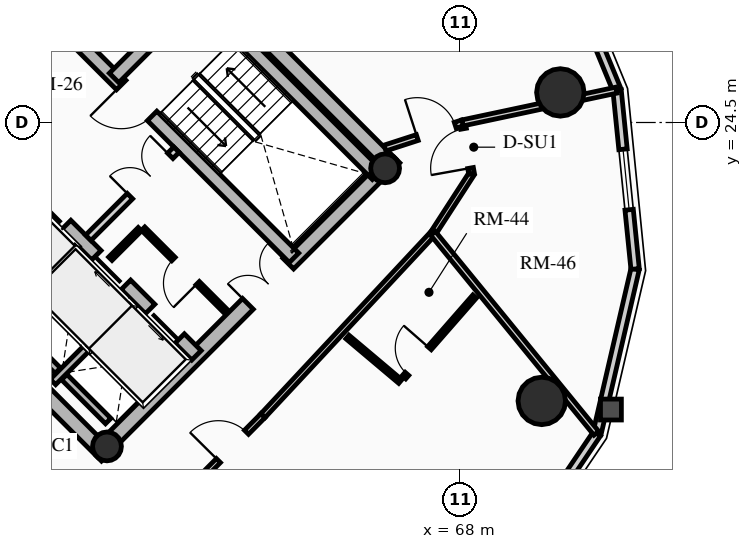
"""IFC4 building model, lengths in metres.
Left out: names, types, materials, properties, quantities, classifications, styles, units other than length and angle.
Written with IfcOpenShell. Run it as: python <this file> out.ifc"""

import sys

from ifc_helpers import new_model, si_unit, direction, frame, frame_2d, origin, origin_2d, place, context, subcontext, project, spatial, rectangle, circle, hollow_circle, extrude, source, transform, mapped, element, fill, save


model = new_model("IFC4")
c1 = context("Model", 3, precision=1e-05, world=origin(), true_north=direction((0.0, 1.0)))
c2 = subcontext(c1, "Body", "Model", "MODEL_VIEW")
j1 = project(units=[si_unit("LENGTHUNIT", "METRE"), si_unit("PLANEANGLEUNIT", "RADIAN")], contexts=[c1])
p1 = place(None, origin())
s1 = spatial("IfcSite", under=j1, at=p1, CompositionType="ELEMENT")
p2 = place(p1, origin())
s2 = spatial("IfcBuilding", under=s1, at=p2, CompositionType="ELEMENT")
p3 = place(p2, frame((0.0, 0.0, 183.61)))
s3 = spatial("IfcBuildingStorey", under=s2, at=p3, CompositionType="ELEMENT", Elevation=183.61)
for number, where, z_axis, x_axis in (
    (1, (58.702, 15.732, 0.0), (0.0, 0.0, 1.0), (-0.707, 0.707, 0.0)),
    (2, (66.268, 23.298, 0.0), (0.0, 0.0, 1.0), (-0.707, 0.707, 0.0)),
):
    element("IfcWall", number, at=place(p3, frame(where, z_axis=z_axis, x_axis=x_axis)), inside=s3, PredefinedType="SHEAR", context=c2, shape_type="SweptSolid", body=[
        extrude(rectangle(XDim=14.1, YDim=0.4, at=frame_2d((7.05, 0.0))), origin(), (0.0, 0.0, 1.0), 2.91),
    ])
p4 = place(p3, frame((58.561, 15.873, 0.0), z_axis=(0.0, 0.0, 1.0), x_axis=(0.707106781187, 0.707106781187, 0.0)))
e3 = element("IfcWall", 3, at=p4, inside=s3, PredefinedType="SHEAR", context=c2, shape_type="SweptSolid", body=[
    extrude(rectangle(XDim=10.7, YDim=0.4, at=frame_2d((5.35, 0.0))), origin(), (0.0, 0.0, 1.0), 2.91),
])
m1 = source(origin(), c2, "Body", "SweptSolid", [
    extrude(rectangle(XDim=1.5, YDim=2.02, at=frame_2d((0.75, 1.01))), frame((0.0, 0.21, 0.0), z_axis=(0.0, -1.0, 0.0), x_axis=(1.0, 0.0, 0.0)), (0.0, 0.0, 1.0), 0.42),
])
p5 = place(p4, frame((5.45, 0.0, 0.0)))
e4 = element("IfcOpeningElement", 4, at=p5, cuts=e3, PredefinedType="OPENING", context=c2, shape_type="MappedRepresentation", body=[
    mapped(m1, transform((0.0, 0.0, 0.0), x_axis=(1.0, 0.0, 0.0), y_axis=(0.0, 1.0, 0.0), z_axis=(0.0, 0.0, 1.0), scale=1.0)),
])
p6 = place(p3, frame((61.06, 18.373, 0.0), z_axis=(0.0, 0.0, 1.0), x_axis=(-0.707106781187, 0.707106781187, 0.0)))
e5 = element("IfcWall", 5, at=p6, inside=s3, PredefinedType="SHEAR", context=c2, shape_type="SweptSolid", body=[
    extrude(rectangle(XDim=13.7, YDim=0.35, at=frame_2d((6.85, 0.0))), origin(), (0.0, 0.0, 1.0), 2.91),
])
m2 = source(origin(), c2, "Body", "SweptSolid", [
    extrude(rectangle(XDim=1.1, YDim=2.015, at=frame_2d((0.55, 1.007))), frame((0.0, 0.185, 0.0), z_axis=(0.0, -1.0, 0.0), x_axis=(1.0, 0.0, 0.0)), (0.0, 0.0, 1.0), 0.37),
])
p7 = place(p6, frame((4.85, 0.0, 0.0)))
e6 = element("IfcOpeningElement", 6, at=p7, cuts=e5, PredefinedType="OPENING", context=c2, shape_type="MappedRepresentation", body=[
    mapped(m2, transform((0.0, 0.0, 0.0), x_axis=(1.0, 0.0, 0.0), y_axis=(0.0, 1.0, 0.0), z_axis=(0.0, 0.0, 1.0), scale=1.0)),
])
p8 = place(p6, frame((0.625, 0.0, 0.0)))
e7 = element("IfcOpeningElement", 7, at=p8, cuts=e5, PredefinedType="OPENING", context=c2, shape_type="MappedRepresentation", body=[
    mapped(m2, transform((0.0, 0.0, 0.0), x_axis=(1.0, 0.0, 0.0), y_axis=(0.0, 1.0, 0.0), z_axis=(0.0, 0.0, 1.0), scale=1.0)),
])
p9 = place(p6, frame((2.625, 0.0, 0.0)))
e8 = element("IfcOpeningElement", 8, at=p9, cuts=e5, PredefinedType="OPENING", context=c2, shape_type="MappedRepresentation", body=[
    mapped(m2, transform((0.0, 0.0, 0.0), x_axis=(1.0, 0.0, 0.0), y_axis=(0.0, 1.0, 0.0), z_axis=(0.0, 0.0, 1.0), scale=1.0)),
])
m3 = source(origin(), c2, "Body", "SweptSolid", [
    extrude(rectangle(XDim=1.15, YDim=2.02, at=frame_2d((0.575, 1.01))), frame((0.0, 0.185, 0.0), z_axis=(0.0, -1.0, 0.0), x_axis=(1.0, 0.0, 0.0)), (0.0, 0.0, 1.0), 0.37),
])
p10 = place(p6, frame((7.27, 0.0, 0.0)))
e9 = element("IfcOpeningElement", 9, at=p10, cuts=e5, PredefinedType="OPENING", context=c2, shape_type="MappedRepresentation", body=[
    mapped(m3, transform((0.0, 0.0, 0.0), x_axis=(1.0, 0.0, 0.0), y_axis=(0.0, 1.0, 0.0), z_axis=(0.0, 0.0, 1.0), scale=1.0)),
])
p11 = place(p3, frame((63.627, 20.94, 0.0), z_axis=(0.0, 0.0, 1.0), x_axis=(-0.707119496762, 0.707094065383, 0.0)))
e10 = element("IfcWall", 10, at=p11, inside=s3, PredefinedType="SHEAR", context=c2, shape_type="SweptSolid", body=[
    extrude(rectangle(XDim=9.6, YDim=0.35, at=frame_2d((4.8, 0.0))), origin(), (0.0, 0.0, 1.0), 2.91),
])
p12 = place(p11, frame((5.28, 0.0, 0.0)))
e11 = element("IfcOpeningElement", 11, at=p12, cuts=e10, PredefinedType="OPENING", context=c2, shape_type="MappedRepresentation", body=[
    mapped(m3, transform((0.0, 0.0, 0.0), x_axis=(1.0, 0.0, 0.0), y_axis=(0.0, 1.0, 0.0), z_axis=(0.0, 0.0, 1.0), scale=1.0)),
])
p13 = place(p3, frame((65.812, 23.125, 0.0), z_axis=(0.0, 0.0, 1.0), x_axis=(-0.707106781187, 0.707106781187, 0.0)))
e12 = element("IfcWall", 12, at=p13, inside=s3, PredefinedType="SHEAR", context=c2, shape_type="SweptSolid", body=[
    extrude(rectangle(XDim=6.695, YDim=0.35, at=frame_2d((3.348, 0.0))), origin(), (0.0, 0.0, 1.0), 2.91),
])
p14 = place(p3, frame((58.893, 25.674, 0.0), z_axis=(0.0, 0.0, 1.0), x_axis=(0.707106781187, 0.707106781187, 0.0)))
e13 = element("IfcWall", 13, at=p14, inside=s3, PredefinedType="SHEAR", context=c2, shape_type="SweptSolid", body=[
    extrude(rectangle(XDim=3.285, YDim=0.35, at=frame_2d((1.643, 0.0))), origin(), (0.0, 0.0, 1.0), 2.91),
])
for number, where, z_axis, x_axis in (
    (14, (58.706, 15.976, 0.0), (0.0, 0.0, 1.0), (0.707, 0.707, 0.0)),
    (15, (66.024, 23.294, 0.0), (0.0, 0.0, 1.0), (0.707, 0.707, 0.0)),
):
    element("IfcColumn", number, at=place(p3, frame(where, z_axis=z_axis, x_axis=x_axis)), inside=s3, PredefinedType="COLUMN", context=c2, shape_type="SweptSolid", body=[
        extrude(hollow_circle(Radius=0.38, WallThickness=0.032, at=origin_2d()), origin(), (0.0, 0.0, 1.0), 2.91),
    ])
for number, where, z_axis, x_axis in (
    (16, (70.146, 17.173, 0.0), (0.0, 0.0, 1.0), (1.0, 0.0, 0.0)),
    (17, (70.635, 25.291, 0.0), (0.0, 0.0, 1.0), (1.0, 0.0, 0.0)),
):
    element("IfcColumn", number, at=place(p3, frame(where, z_axis=z_axis, x_axis=x_axis)), inside=s3, PredefinedType="USERDEFINED", context=c2, shape_type="SweptSolid", body=[
        extrude(circle(Radius=0.625, at=origin_2d()), origin(), (0.0, 0.0, 1.0), 2.91),
    ])
p15 = place(p3, frame((71.6, 16.313, 0.0), z_axis=(0.0, 0.0, 1.0), x_axis=(-0.55951912514, -0.828817439852, 0.0)))
e18 = element("IfcWall", 18, at=p15, inside=s3, PredefinedType="SOLIDWALL", context=c2, shape_type="SweptSolid", body=[
    extrude(rectangle(XDim=4.259, YDim=0.22, at=frame_2d((2.129, 0.0))), origin(), (0.0, 0.0, 1.0), 2.245),
])
m4 = source(origin(), c2, "Body", "SweptSolid", [
    extrude(rectangle(XDim=1.6, YDim=1.3, at=frame_2d((0.8, 0.65))), frame((0.0, 0.12, 0.0), z_axis=(0.0, -1.0, 0.0), x_axis=(1.0, 0.0, 0.0)), (0.0, 0.0, 1.0), 0.24),
])
p16 = place(p15, frame((1.33, 0.0, 0.65)))
e19 = element("IfcOpeningElement", 19, at=p16, cuts=e18, PredefinedType="OPENING", context=c2, shape_type="MappedRepresentation", body=[
    mapped(m4, transform((0.0, 0.0, 0.0), x_axis=(1.0, 0.0, 0.0), y_axis=(0.0, 1.0, 0.0), z_axis=(0.0, 0.0, 1.0), scale=1.0)),
])
p17 = place(p3, frame((72.603, 20.645, 0.0), z_axis=(0.0, 0.0, 1.0), x_axis=(-0.22557328587, -0.97422620202, 0.0)))
e20 = element("IfcWall", 20, at=p17, inside=s3, PredefinedType="SOLIDWALL", context=c2, shape_type="SweptSolid", body=[
    extrude(rectangle(XDim=4.446, YDim=0.22, at=frame_2d((2.223, 0.0))), origin(), (0.0, 0.0, 1.0), 2.245),
])
p18 = place(p3, frame((72.127, 25.354, 0.0), z_axis=(0.0, 0.0, 1.0), x_axis=(0.100438356004, -0.994943283129, 0.0)))
e21 = element("IfcWall", 21, at=p18, inside=s3, PredefinedType="SOLIDWALL", context=c2, shape_type="SweptSolid", body=[
    extrude(rectangle(XDim=4.733, YDim=0.22, at=frame_2d((2.366, 0.0))), origin(), (0.0, 0.0, 1.0), 2.245),
])
p19 = place(p18, frame((1.566, 0.0, 0.65)))
e22 = element("IfcOpeningElement", 22, at=p19, cuts=e21, PredefinedType="OPENING", context=c2, shape_type="MappedRepresentation", body=[
    mapped(m4, transform((0.0, 0.0, 0.0), x_axis=(1.0, 0.0, 0.0), y_axis=(0.0, 1.0, 0.0), z_axis=(0.0, 0.0, 1.0), scale=1.0)),
])
p20 = place(p3, frame((70.22, 29.979, 0.0), z_axis=(0.0, 0.0, 1.0), x_axis=(0.381196434348, -0.924494066201, 0.0)))
e23 = element("IfcWall", 23, at=p20, inside=s3, PredefinedType="SOLIDWALL", context=c2, shape_type="SweptSolid", body=[
    extrude(rectangle(XDim=5.003, YDim=0.22, at=frame_2d((2.501, 0.0))), origin(), (0.0, 0.0, 1.0), 2.245),
])
p21 = place(p3, frame((55.888, 19.069, 0.0), z_axis=(0.0, 0.0, 1.0), x_axis=(0.707106781187, 0.707106781187, 0.0)))
e24 = element("IfcWall", 24, at=p21, inside=s3, PredefinedType="SHEAR", context=c2, shape_type="SweptSolid", body=[
    extrude(rectangle(XDim=2.97, YDim=0.2, at=frame_2d((1.485, 0.0))), origin(), (0.0, 0.0, 1.0), 2.91),
])
p22 = place(p3, frame((57.284, 17.673, 0.0), z_axis=(0.0, 0.0, 1.0), x_axis=(0.707147878904, 0.70706568108, 0.0)))
e25 = element("IfcWall", 25, at=p22, inside=s3, PredefinedType="SHEAR", context=c2, shape_type="SweptSolid", body=[
    extrude(rectangle(XDim=2.97, YDim=0.2, at=frame_2d((1.485, 0.0))), origin(), (0.0, 0.0, 1.0), 2.91),
])
p23 = place(p3, frame((57.412, 17.97, 0.0), z_axis=(0.0, 0.0, 1.0), x_axis=(-0.707106781187, 0.707106781187, 0.0)))
e26 = element("IfcWall", 26, at=p23, inside=s3, PredefinedType="SHEAR", context=c2, shape_type="SweptSolid", body=[
    extrude(rectangle(XDim=1.735, YDim=0.2, at=frame_2d((0.867, 0.0))), origin(), (0.0, 0.0, 1.0), 2.91),
])
p24 = place(p3, frame((58.737, 16.644, 0.0), z_axis=(0.0, 0.0, 1.0), x_axis=(-0.707032117043, 0.707181437447, 0.0)))
e27 = element("IfcWall", 27, at=p24, inside=s3, PredefinedType="SHEAR", context=c2, shape_type="SweptSolid", body=[
    extrude(rectangle(XDim=1.635, YDim=0.2, at=frame_2d((0.817, 0.0))), origin(), (0.0, 0.0, 1.0), 2.91),
])
p25 = place(p3, frame((58.214, 21.467, 0.0), z_axis=(0.0, 0.0, 1.0), x_axis=(0.707106781187, 0.707106781187, 0.0)))
e28 = element("IfcWall", 28, at=p25, inside=s3, PredefinedType="PARTITIONING", context=c2, shape_type="SweptSolid", body=[
    extrude(rectangle(XDim=3.28, YDim=0.2, at=frame_2d((1.64, 0.0))), origin(), (0.0, 0.0, 1.0), 2.675),
])
m5 = source(origin(), c2, "Body", "SweptSolid", [
    extrude(rectangle(XDim=1.5, YDim=2.02, at=frame_2d((0.75, 1.01))), frame((0.0, 0.11, 0.0), z_axis=(0.0, -1.0, 0.0), x_axis=(1.0, 0.0, 0.0)), (0.0, 0.0, 1.0), 0.22),
])
p26 = place(p25, frame((1.55, 0.0, 0.0)))
e29 = element("IfcOpeningElement", 29, at=p26, cuts=e28, PredefinedType="OPENING", context=c2, shape_type="MappedRepresentation", body=[
    mapped(m5, transform((0.0, 0.0, 0.0), x_axis=(1.0, 0.0, 0.0), y_axis=(0.0, 1.0, 0.0), z_axis=(0.0, 0.0, 1.0), scale=1.0)),
])
p27 = place(p3, frame((54.961, 24.719, 0.0), z_axis=(0.0, 0.0, 1.0), x_axis=(0.707106781187, 0.707106781187, 0.0)))
e30 = element("IfcWall", 30, at=p27, inside=s3, PredefinedType="PARTITIONING", context=c2, shape_type="SweptSolid", body=[
    extrude(rectangle(XDim=3.28, YDim=0.2, at=frame_2d((1.64, 0.0))), origin(), (0.0, 0.0, 1.0), 2.675),
])
m6 = source(origin(), c2, "Body", "SweptSolid", [
    extrude(rectangle(XDim=0.9, YDim=2.005, at=frame_2d((0.45, 1.002))), frame((0.0, 0.11, 0.0), z_axis=(0.0, -1.0, 0.0), x_axis=(1.0, 0.0, 0.0)), (0.0, 0.0, 1.0), 0.22),
])
p28 = place(p27, frame((0.16, 0.0, 0.0)))
e31 = element("IfcOpeningElement", 31, at=p28, cuts=e30, PredefinedType="OPENING", context=c2, shape_type="MappedRepresentation", body=[
    mapped(m6, transform((0.0, 0.0, 0.0), x_axis=(1.0, 0.0, 0.0), y_axis=(0.0, 1.0, 0.0), z_axis=(0.0, 0.0, 1.0), scale=1.0)),
])
p29 = place(p3, frame((61.835, 19.529, 0.0), z_axis=(0.0, 0.0, 1.0), x_axis=(-0.707146413884, 0.707067146267, 0.0)))
e32 = element("IfcWall", 32, at=p29, inside=s3, PredefinedType="PARTITIONING", context=c2, shape_type="SweptSolid", body=[
    extrude(rectangle(XDim=3.08, YDim=0.125, at=frame_2d((1.54, 0.0))), origin(), (0.0, 0.0, 1.0), 2.675),
])
m7 = source(origin(), c2, "Body", "SweptSolid", [
    extrude(rectangle(XDim=0.9, YDim=2.005, at=frame_2d((0.45, 1.002))), frame((0.0, 0.073, 0.0), z_axis=(0.0, -1.0, 0.0), x_axis=(1.0, 0.0, 0.0)), (0.0, 0.0, 1.0), 0.145),
])
p30 = place(p29, frame((1.05, 0.0, 0.0)))
e33 = element("IfcOpeningElement", 33, at=p30, cuts=e32, PredefinedType="OPENING", context=c2, shape_type="MappedRepresentation", body=[
    mapped(m7, transform((0.0, 0.0, 0.0), x_axis=(1.0, 0.0, 0.0), y_axis=(0.0, 1.0, 0.0), z_axis=(0.0, 0.0, 1.0), scale=1.0)),
])
p31 = place(p3, frame((58.794, 20.915, 0.0), z_axis=(0.0, 0.0, 1.0), x_axis=(0.707106781187, 0.707106781187, 0.0)))
e34 = element("IfcWall", 34, at=p31, inside=s3, PredefinedType="PARTITIONING", context=c2, shape_type="SweptSolid", body=[
    extrude(rectangle(XDim=1.1, YDim=0.125, at=frame_2d((0.55, 0.0))), origin(), (0.0, 0.0, 1.0), 2.675),
])
p32 = place(p3, frame((60.501, 14.457, 0.0), z_axis=(0.0, 0.0, 1.0), x_axis=(0.704012266258, 0.710187812454, 0.0)))
e35 = element("IfcWall", 35, at=p32, inside=s3, PredefinedType="PARTITIONING", context=c2, shape_type="SweptSolid", body=[
    extrude(rectangle(XDim=3.281, YDim=0.15, at=frame_2d((1.641, 0.0))), origin(), (0.0, 0.0, 1.0), 2.245),
])
m8 = source(origin(), c2, "Body", "SweptSolid", [
    extrude(rectangle(XDim=1.05, YDim=2.015, at=frame_2d((0.525, 1.007))), frame((0.0, 0.085, 0.0), z_axis=(0.0, -1.0, 0.0), x_axis=(1.0, 0.0, 0.0)), (0.0, 0.0, 1.0), 0.17),
])
p33 = place(p32, frame((1.614, 0.0, 0.0)))
e36 = element("IfcOpeningElement", 36, at=p33, cuts=e35, PredefinedType="OPENING", context=c2, shape_type="MappedRepresentation", body=[
    mapped(m8, transform((0.0, 0.0, 0.0), x_axis=(1.0, 0.0, 0.0), y_axis=(0.0, 1.0, 0.0), z_axis=(0.0, 0.0, 1.0), scale=1.0)),
])
p34 = place(p3, frame((62.812, 16.788, 0.0), z_axis=(0.0, 0.0, 1.0), x_axis=(0.682323555485, 0.731050316757, 0.0)))
e37 = element("IfcWall", 37, at=p34, inside=s3, PredefinedType="PARTITIONING", context=c2, shape_type="SweptSolid", body=[
    extrude(rectangle(XDim=6.559, YDim=0.15, at=frame_2d((3.279, 0.0))), origin(), (0.0, 0.0, 1.0), 2.245),
])
p35 = place(p3, frame((67.287, 21.582, 0.0), z_axis=(0.0, 0.0, 1.0), x_axis=(0.543202443884, 0.839601753785, 0.0)))
e38 = element("IfcWall", 38, at=p35, inside=s3, PredefinedType="PARTITIONING", context=c2, shape_type="SweptSolid", body=[
    extrude(rectangle(XDim=1.866, YDim=0.15, at=frame_2d((0.933, 0.0))), origin(), (0.0, 0.0, 1.0), 2.245),
])
p36 = place(p3, frame((68.3, 23.149, 0.0), z_axis=(0.0, 0.0, 1.0), x_axis=(-0.176423554694, 0.984314344785, 0.0)))
e39 = element("IfcWall", 39, at=p36, inside=s3, PredefinedType="PARTITIONING", context=c2, shape_type="SweptSolid", body=[
    extrude(rectangle(XDim=1.362, YDim=0.15, at=frame_2d((0.681, 0.0))), origin(), (0.0, 0.0, 1.0), 2.245),
])
p37 = place(p36, frame((0.156, 0.0, 0.0)))
e40 = element("IfcOpeningElement", 40, at=p37, cuts=e39, PredefinedType="OPENING", context=c2, shape_type="MappedRepresentation", body=[
    mapped(m8, transform((0.0, 0.0, 0.0), x_axis=(1.0, 0.0, 0.0), y_axis=(0.0, 1.0, 0.0), z_axis=(0.0, 0.0, 1.0), scale=1.0)),
])
p38 = place(p3, frame((67.287, 21.582, 0.0), z_axis=(0.0, 0.0, 1.0), x_axis=(0.632528819581, -0.774536824431, 0.0)))
e41 = element("IfcWall", 41, at=p38, inside=s3, PredefinedType="PARTITIONING", context=c2, shape_type="SweptSolid", body=[
    extrude(rectangle(XDim=6.791, YDim=0.16, at=frame_2d((3.396, 0.0))), origin(), (0.0, 0.0, 1.0), 2.245),
])
p39 = place(p3, frame((68.06, 24.489, 0.0), z_axis=(0.0, 0.0, 1.0), x_axis=(0.978089830324, 0.2081832938, 0.0)))
e42 = element("IfcWall", 42, at=p39, inside=s3, PredefinedType="PARTITIONING", context=c2, shape_type="SweptSolid", body=[
    extrude(rectangle(XDim=4.138, YDim=0.16, at=frame_2d((2.069, 0.0))), origin(), (0.0, 0.0, 1.0), 2.245),
])
p40 = place(p3, frame((66.021, 23.828, 0.0), z_axis=(0.0, 0.0, 1.0), x_axis=(0.951292345965, 0.308290240695, 0.0)))
e43 = element("IfcWall", 43, at=p40, inside=s3, PredefinedType="PARTITIONING", context=c2, shape_type="SweptSolid", body=[
    extrude(rectangle(XDim=2.144, YDim=0.16, at=frame_2d((1.072, 0.0))), origin(), (0.0, 0.0, 1.0), 2.245),
])
m9 = source(origin(), c2, "Body", "SweptSolid", [
    extrude(rectangle(XDim=1.05, YDim=2.015, at=frame_2d((0.525, 1.007))), frame((0.0, 0.09, 0.0), z_axis=(0.0, -1.0, 0.0), x_axis=(1.0, 0.0, 0.0)), (0.0, 0.0, 1.0), 0.18),
])
p41 = place(p40, frame((0.894, 0.0, 0.0)))
e44 = element("IfcOpeningElement", 44, at=p41, cuts=e43, PredefinedType="OPENING", context=c2, shape_type="MappedRepresentation", body=[
    mapped(m9, transform((0.0, 0.0, 0.0), x_axis=(1.0, 0.0, 0.0), y_axis=(0.0, 1.0, 0.0), z_axis=(0.0, 0.0, 1.0), scale=1.0)),
])
p42 = place(p3, frame((65.033, 18.856, 0.0), z_axis=(0.0, 0.0, 1.0), x_axis=(0.764632588969, -0.644466449, 0.0)))
e45 = element("IfcWall", 45, at=p42, inside=s3, PredefinedType="PARTITIONING", context=c2, shape_type="SweptSolid", body=[
    extrude(rectangle(XDim=1.818, YDim=0.125, at=frame_2d((0.909, 0.0))), origin(), (0.0, 0.0, 1.0), 2.675),
])
p43 = place(p3, frame((66.52, 17.795, 0.0), z_axis=(0.0, 0.0, 1.0), x_axis=(0.658266024679, 0.752785388244, 0.0)))
e46 = element("IfcWall", 46, at=p43, inside=s3, PredefinedType="PARTITIONING", context=c2, shape_type="SweptSolid", body=[
    extrude(rectangle(XDim=2.826, YDim=0.125, at=frame_2d((1.413, 0.0))), origin(), (0.0, 0.0, 1.0), 2.245),
])
p44 = place(p43, frame((0.12, 0.0, 0.0)))
e47 = element("IfcOpeningElement", 47, at=p44, cuts=e46, PredefinedType="OPENING", context=c2, shape_type="MappedRepresentation", body=[
    mapped(m7, transform((0.0, 0.0, 0.0), x_axis=(1.0, 0.0, 0.0), y_axis=(0.0, 1.0, 0.0), z_axis=(0.0, 0.0, 1.0), scale=1.0)),
])
m10 = source(origin(), c2, "Body", "SweptSolid", [
    extrude(rectangle(XDim=1.6, YDim=1.3, at=frame_2d((0.8, 0.65))), frame((0.0, 0.03, 0.0), z_axis=(0.0, -1.0, 0.0), x_axis=(1.0, 0.0, 0.0)), (0.0, 0.0, 1.0), 0.06),
])
p45 = place(p19, origin())
e48 = element("IfcWindow", 48, at=p45, inside=s3, PartitioningType="SINGLE_PANEL", PredefinedType="WINDOW", context=c2, shape_type="MappedRepresentation", body=[
    mapped(m10, transform((0.0, 0.0, 0.0), x_axis=(1.0, 0.0, 0.0), y_axis=(0.0, 1.0, 0.0), z_axis=(0.0, 0.0, 1.0), scale=1.0)),
])
fill(e22, e48)
m11 = source(origin(), c2, "Body", "SweptSolid", [
    extrude(rectangle(XDim=1.1, YDim=2.015, at=frame_2d((0.55, 1.007))), frame((0.0, 0.025, 0.0), z_axis=(0.0, -1.0, 0.0), x_axis=(1.0, 0.0, 0.0)), (0.0, 0.0, 1.0), 0.05),
])
p46 = place(p7, origin())
e49 = element("IfcDoor", 49, at=p46, inside=s3, OperationType="SLIDING_TO_RIGHT", PredefinedType="DOOR", context=c2, shape_type="MappedRepresentation", body=[
    mapped(m11, transform((0.0, 0.0, 0.0), x_axis=(1.0, 0.0, 0.0), y_axis=(0.0, 1.0, 0.0), z_axis=(0.0, 0.0, 1.0), scale=1.0)),
])
fill(e6, e49)
p47 = place(p8, origin())
e50 = element("IfcDoor", 50, at=p47, inside=s3, OperationType="SLIDING_TO_LEFT", PredefinedType="DOOR", context=c2, shape_type="MappedRepresentation", body=[
    mapped(m11, transform((0.0, 0.0, 0.0), x_axis=(1.0, 0.0, 0.0), y_axis=(0.0, 1.0, 0.0), z_axis=(0.0, 0.0, 1.0), scale=1.0)),
])
fill(e7, e50)
p48 = place(p9, origin())
e51 = element("IfcDoor", 51, at=p48, inside=s3, OperationType="SLIDING_TO_RIGHT", PredefinedType="DOOR", context=c2, shape_type="MappedRepresentation", body=[
    mapped(m11, transform((0.0, 0.0, 0.0), x_axis=(1.0, 0.0, 0.0), y_axis=(0.0, 1.0, 0.0), z_axis=(0.0, 0.0, 1.0), scale=1.0)),
])
fill(e8, e51)
m12 = source(origin(), c2, "Body", "SweptSolid", [
    extrude(rectangle(XDim=1.15, YDim=2.02, at=frame_2d((0.575, 1.01))), frame((0.0, 0.025, 0.0), z_axis=(0.0, -1.0, 0.0), x_axis=(1.0, 0.0, 0.0)), (0.0, 0.0, 1.0), 0.05),
])
p49 = place(p12, origin())
e52 = element("IfcDoor", 52, at=p49, inside=s3, OperationType="SINGLE_SWING_RIGHT", PredefinedType="DOOR", context=c2, shape_type="MappedRepresentation", body=[
    mapped(m12, transform((0.0, 0.0, 0.0), x_axis=(1.0, 0.0, 0.0), y_axis=(0.0, 1.0, 0.0), z_axis=(0.0, 0.0, 1.0), scale=1.0)),
])
fill(e11, e52)
m13 = source(origin(), c2, "Body", "SweptSolid", [
    extrude(rectangle(XDim=1.5, YDim=2.02, at=frame_2d((0.75, 1.01))), frame((0.0, 0.025, 0.0), z_axis=(0.0, -1.0, 0.0), x_axis=(1.0, 0.0, 0.0)), (0.0, 0.0, 1.0), 0.05),
])
p50 = place(p5, origin())
e53 = element("IfcDoor", 53, at=p50, inside=s3, OperationType="DOUBLE_DOOR_SINGLE_SWING", PredefinedType="DOOR", context=c2, shape_type="MappedRepresentation", body=[
    mapped(m13, transform((0.0, 0.0, 0.0), x_axis=(1.0, 0.0, 0.0), y_axis=(0.0, 1.0, 0.0), z_axis=(0.0, 0.0, 1.0), scale=1.0)),
])
fill(e4, e53)
p51 = place(p26, origin())
e54 = element("IfcDoor", 54, at=p51, inside=s3, OperationType="DOUBLE_DOOR_SINGLE_SWING", PredefinedType="DOOR", context=c2, shape_type="MappedRepresentation", body=[
    mapped(m13, transform((0.0, 0.0, 0.0), x_axis=(1.0, 0.0, 0.0), y_axis=(0.0, 1.0, 0.0), z_axis=(0.0, 0.0, 1.0), scale=1.0)),
])
fill(e29, e54)
m14 = source(origin(), c2, "Body", "SweptSolid", [
    extrude(rectangle(XDim=0.9, YDim=2.005, at=frame_2d((0.45, 1.002))), frame((0.0, 0.025, 0.0), z_axis=(0.0, -1.0, 0.0), x_axis=(1.0, 0.0, 0.0)), (0.0, 0.0, 1.0), 0.05),
])
p52 = place(p30, origin())
e55 = element("IfcDoor", 55, at=p52, inside=s3, OperationType="SINGLE_SWING_LEFT", PredefinedType="DOOR", context=c2, shape_type="MappedRepresentation", body=[
    mapped(m14, transform((0.0, 0.0, 0.0), x_axis=(1.0, 0.0, 0.0), y_axis=(0.0, 1.0, 0.0), z_axis=(0.0, 0.0, 1.0), scale=1.0)),
])
fill(e33, e55)
m15 = source(origin(), c2, "Body", "SweptSolid", [
    extrude(rectangle(XDim=1.05, YDim=2.015, at=frame_2d((0.525, 1.007))), frame((0.0, 0.025, 0.0), z_axis=(0.0, -1.0, 0.0), x_axis=(1.0, 0.0, 0.0)), (0.0, 0.0, 1.0), 0.05),
])
p53 = place(p41, origin())
e56 = element("IfcDoor", 56, at=p53, inside=s3, OperationType="SINGLE_SWING_LEFT", PredefinedType="DOOR", context=c2, shape_type="MappedRepresentation", body=[
    mapped(m15, transform((0.0, 0.0, 0.0), x_axis=(1.0, 0.0, 0.0), y_axis=(0.0, 1.0, 0.0), z_axis=(0.0, 0.0, 1.0), scale=1.0)),
])
fill(e44, e56)
p54 = place(p33, origin())
e57 = element("IfcDoor", 57, at=p54, inside=s3, OperationType="SINGLE_SWING_LEFT", PredefinedType="DOOR", context=c2, shape_type="MappedRepresentation", body=[
    mapped(m15, transform((0.0, 0.0, 0.0), x_axis=(1.0, 0.0, 0.0), y_axis=(0.0, 1.0, 0.0), z_axis=(0.0, 0.0, 1.0), scale=1.0)),
])
fill(e36, e57)
p55 = place(p44, origin())
e58 = element("IfcDoor", 58, at=p55, inside=s3, OperationType="SINGLE_SWING_RIGHT", PredefinedType="DOOR", context=c2, shape_type="MappedRepresentation", body=[
    mapped(m14, transform((0.0, 0.0, 0.0), x_axis=(1.0, 0.0, 0.0), y_axis=(0.0, 1.0, 0.0), z_axis=(0.0, 0.0, 1.0), scale=1.0)),
])
fill(e47, e58)
p56 = place(p37, origin())
e59 = element("IfcDoor", 59, at=p56, inside=s3, OperationType="SINGLE_SWING_LEFT", PredefinedType="DOOR", context=c2, shape_type="MappedRepresentation", body=[
    mapped(m15, transform((0.0, 0.0, 0.0), x_axis=(1.0, 0.0, 0.0), y_axis=(0.0, 1.0, 0.0), z_axis=(0.0, 0.0, 1.0), scale=1.0)),
])
fill(e40, e59)
save(model, sys.argv[1])
